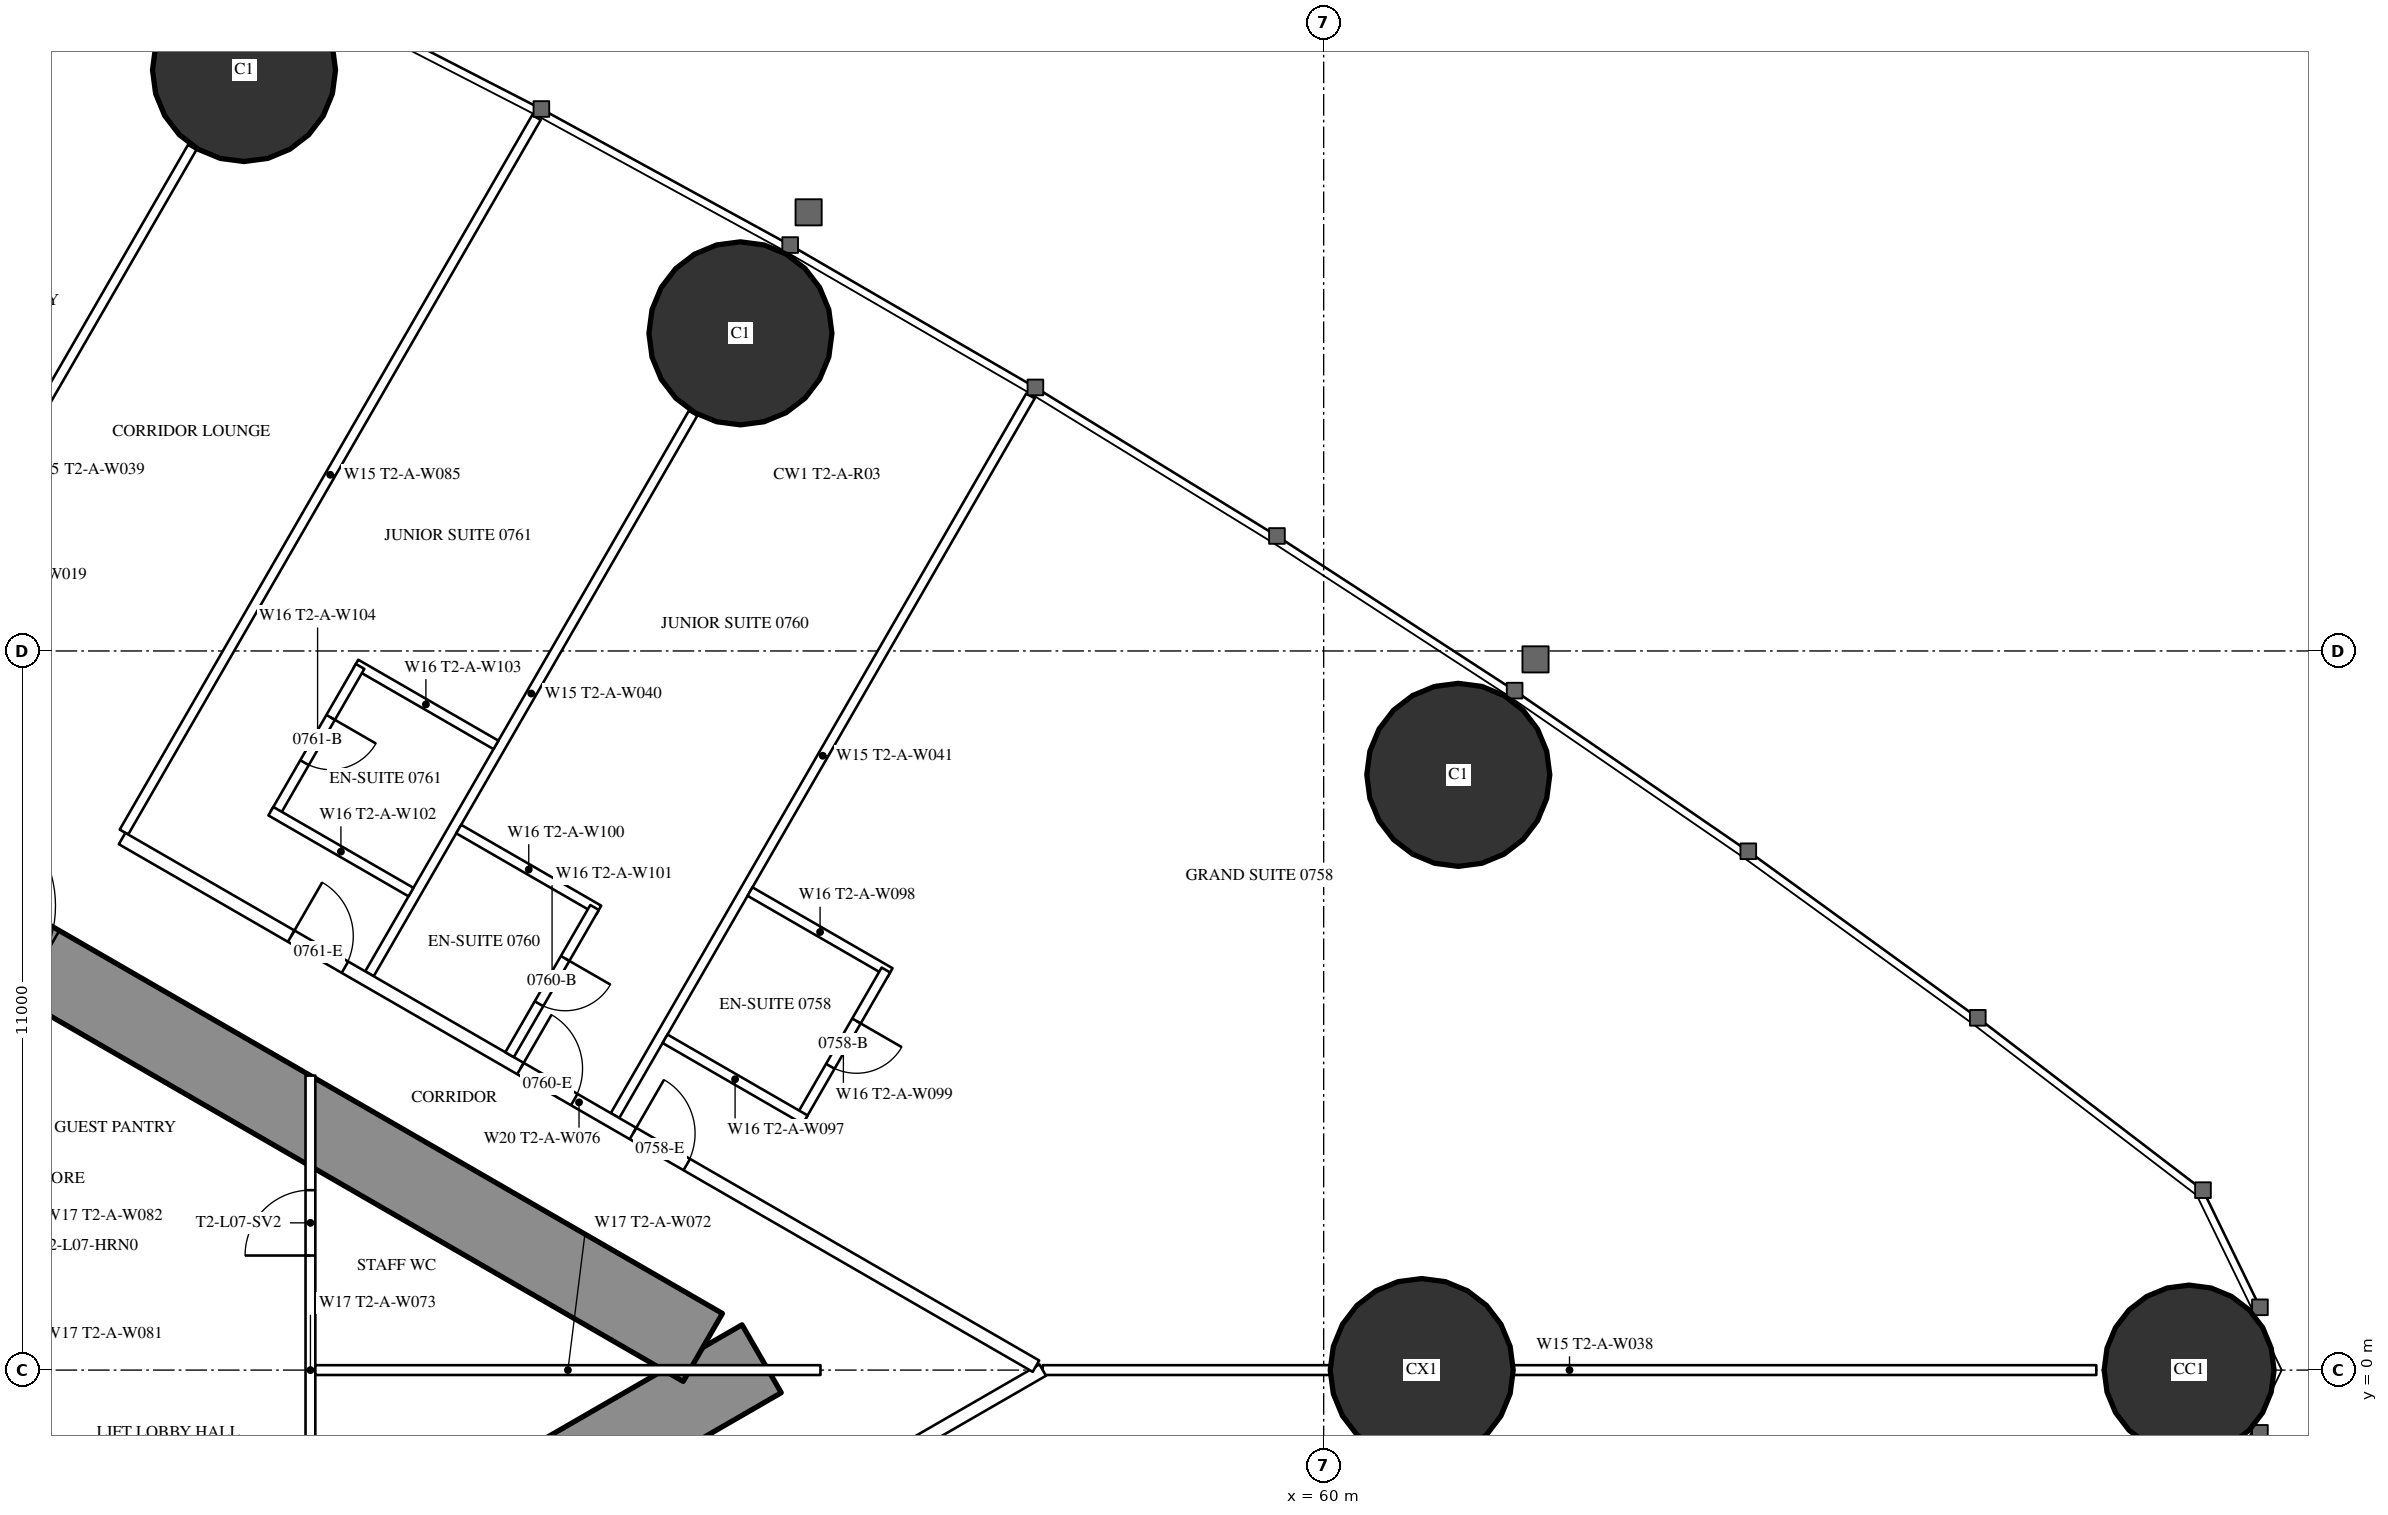
"""IFC4 building model, lengths in metres.
Left out: names, types, materials, properties, quantities, classifications, styles, units other than length and angle.
Written with IfcOpenShell. Run it as: python <this file> out.ifc"""

import sys

from ifc_helpers import new_model, si_unit, direction, frame, frame_2d, origin, origin_2d, place, context, subcontext, project, spatial, rectangle, hollow_circle, extrude, element, fill, save


model = new_model("IFC4")
c1 = context("Model", 3, precision=1e-05, world=origin(), true_north=direction((0.0, 1.0)))
c2 = subcontext(c1, "Body", "Model", "MODEL_VIEW")
j1 = project(units=[si_unit("LENGTHUNIT", "METRE"), si_unit("PLANEANGLEUNIT", "RADIAN")], contexts=[c1])
p1 = place(None, origin())
s1 = spatial("IfcSite", under=j1, at=p1, CompositionType="ELEMENT")
p2 = place(p1, origin())
s2 = spatial("IfcBuilding", under=s1, at=p2, CompositionType="ELEMENT")
p3 = place(p2, frame((0.0, 0.0, 32.0)))
s3 = spatial("IfcBuildingStorey", under=s2, at=p3, CompositionType="ELEMENT", Elevation=32.0)
p4 = place(p3, frame((73.239, 0.0, 0.0), z_axis=(0.0, 0.0, 1.0), x_axis=(1.0, 0.0, 0.0)))
e1 = element("IfcColumn", 1, at=p4, inside=s3, PredefinedType="COLUMN", context=c2, shape_type="SweptSolid", body=[
    extrude(hollow_circle(Radius=1.3, WallThickness=0.1, at=origin_2d()), origin(), (0.0, 0.0, 1.0), 3.5),
])
for number, where, z_axis, x_axis in (
    (2, (62.059, 9.105, 0.0), (0.0, 0.0, 1.0), (1.0, 0.0, 0.0)),
    (3, (51.078, 15.858, 0.0), (0.0, 0.0, 1.0), (1.0, 0.0, 0.0)),
    (4, (43.484, 19.886, 0.0), (0.0, 0.0, 1.0), (1.0, 0.0, 0.0)),
):
    element("IfcColumn", number, at=place(p3, frame(where, z_axis=z_axis, x_axis=x_axis)), inside=s3, PredefinedType="COLUMN", context=c2, shape_type="SweptSolid", body=[
        extrude(hollow_circle(Radius=1.4, WallThickness=0.12, at=origin_2d()), origin(), (0.0, 0.0, 1.0), 3.5),
    ])
p5 = place(p3, frame((61.5, 0.0, 0.0), z_axis=(0.0, 0.0, 1.0), x_axis=(1.0, 0.0, 0.0)))
e5 = element("IfcColumn", 5, at=p5, inside=s3, PredefinedType="COLUMN", context=c2, shape_type="SweptSolid", body=[
    extrude(hollow_circle(Radius=1.4, WallThickness=0.1, at=origin_2d()), origin(), (0.0, 0.0, 1.0), 3.5),
])
p6 = place(p3, frame((27.2, -13.8, 0.0), z_axis=(0.0, 0.0, 1.0), x_axis=(0.866027159892, 0.499996958321, 0.0)))
e6 = element("IfcWall", 6, at=p6, inside=s3, PredefinedType="SHEAR", context=c2, shape_type="SweptSolid", body=[
    extrude(rectangle(XDim=27.947, YDim=1.2, at=frame_2d((13.973, 0.0))), origin(), (0.0, 0.0, 1.0), 3.5),
])
p7 = place(p6, frame((4.6, 0.0, 0.0)))
e7 = element("IfcOpeningElement", 7, at=p7, cuts=e6, PredefinedType="OPENING", context=c2, shape_type="SweptSolid", body=[
    extrude(rectangle(XDim=1.0, YDim=2.2, at=frame_2d((0.5, 1.1))), frame((0.0, 0.61, 0.0), z_axis=(0.0, -1.0, 0.0), x_axis=(1.0, 0.0, 0.0)), (0.0, 0.0, 1.0), 1.22),
])
p8 = place(p6, frame((13.395, 0.0, 0.0)))
e8 = element("IfcOpeningElement", 8, at=p8, cuts=e6, PredefinedType="OPENING", context=c2, shape_type="SweptSolid", body=[
    extrude(rectangle(XDim=1.8, YDim=2.2, at=frame_2d((0.9, 1.1))), frame((0.0, 0.61, 0.0), z_axis=(0.0, -1.0, 0.0), x_axis=(1.0, 0.0, 0.0)), (0.0, 0.0, 1.0), 1.22),
])
p9 = place(p3, frame((27.2, 13.8, 0.0), z_axis=(0.0, 0.0, 1.0), x_axis=(0.866024515034, -0.500001539357, 0.0)))
e9 = element("IfcWall", 9, at=p9, inside=s3, PredefinedType="SHEAR", context=c2, shape_type="SweptSolid", body=[
    extrude(rectangle(XDim=26.907, YDim=1.2, at=frame_2d((13.454, 0.0))), origin(), (0.0, 0.0, 1.0), 3.5),
])
p10 = place(p9, frame((4.6, 0.0, 0.0)))
e10 = element("IfcOpeningElement", 10, at=p10, cuts=e9, PredefinedType="OPENING", context=c2, shape_type="SweptSolid", body=[
    extrude(rectangle(XDim=1.0, YDim=2.2, at=frame_2d((0.5, 1.1))), frame((0.0, 0.61, 0.0), z_axis=(0.0, -1.0, 0.0), x_axis=(1.0, 0.0, 0.0)), (0.0, 0.0, 1.0), 1.22),
])
p11 = place(p9, frame((13.395, 0.0, 0.0)))
e11 = element("IfcOpeningElement", 11, at=p11, cuts=e9, PredefinedType="OPENING", context=c2, shape_type="SweptSolid", body=[
    extrude(rectangle(XDim=1.8, YDim=2.2, at=frame_2d((0.9, 1.1))), frame((0.0, 0.61, 0.0), z_axis=(0.0, -1.0, 0.0), x_axis=(1.0, 0.0, 0.0)), (0.0, 0.0, 1.0), 1.22),
])
p12 = place(p3, frame((37.895, 10.396, 0.0), z_axis=(0.0, 0.0, 1.0), x_axis=(0.499995616528, 0.866027934568, 0.0)))
e12 = element("IfcWall", 12, at=p12, inside=s3, PredefinedType="PARTITIONING", context=c2, shape_type="SweptSolid", body=[
    extrude(rectangle(XDim=9.593, YDim=0.15, at=frame_2d((4.797, 0.0))), origin(), (0.0, 0.0, 1.0), 2.25),
])
p13 = place(p3, frame((41.647, 8.23, 0.0), z_axis=(0.0, 0.0, 1.0), x_axis=(0.49998590462, 0.866033541603, 0.0)))
e13 = element("IfcWall", 13, at=p13, inside=s3, PredefinedType="PARTITIONING", context=c2, shape_type="SweptSolid", body=[
    extrude(rectangle(XDim=12.621, YDim=0.15, at=frame_2d((6.311, 0.0))), origin(), (0.0, 0.0, 1.0), 3.25),
])
p14 = place(p3, frame((45.403, 6.062, 0.0), z_axis=(0.0, 0.0, 1.0), x_axis=(0.500013434677, 0.866017647131, 0.0)))
e14 = element("IfcWall", 14, at=p14, inside=s3, PredefinedType="PARTITIONING", context=c2, shape_type="SweptSolid", body=[
    extrude(rectangle(XDim=9.902, YDim=0.15, at=frame_2d((4.951, 0.0))), origin(), (0.0, 0.0, 1.0), 2.25),
])
p15 = place(p3, frame((49.159, 3.893, 0.0), z_axis=(0.0, 0.0, 1.0), x_axis=(0.499995664361, 0.866027906952, 0.0)))
e15 = element("IfcWall", 15, at=p15, inside=s3, PredefinedType="PARTITIONING", context=c2, shape_type="SweptSolid", body=[
    extrude(rectangle(XDim=12.711, YDim=0.15, at=frame_2d((6.356, 0.0))), origin(), (0.0, 0.0, 1.0), 3.25),
])
p16 = place(p3, frame((55.702, 0.0, 0.0), z_axis=(0.0, 0.0, 1.0), x_axis=(1.0, 0.0, 0.0)))
e16 = element("IfcWall", 16, at=p16, inside=s3, PredefinedType="PARTITIONING", context=c2, shape_type="SweptSolid", body=[
    extrude(rectangle(XDim=16.117, YDim=0.15, at=frame_2d((8.059, 0.0))), origin(), (0.0, 0.0, 1.0), 2.25),
])
p17 = place(p3, frame((37.96, -10.243, 0.0), z_axis=(0.0, 0.0, 1.0), x_axis=(0.866026429433, 0.499998223521, 0.0)))
e17 = element("IfcWall", 17, at=p17, inside=s3, PredefinedType="PARTITIONING", context=c2, shape_type="SweptSolid", body=[
    extrude(rectangle(XDim=20.487, YDim=0.2, at=frame_2d((10.243, 0.0))), origin(), (0.0, 0.0, 1.0), 3.25),
])
p18 = place(p17, frame((4.575, 0.0, 0.0)))
e18 = element("IfcOpeningElement", 18, at=p18, cuts=e17, PredefinedType="OPENING", context=c2, shape_type="SweptSolid", body=[
    extrude(rectangle(XDim=0.95, YDim=2.2, at=frame_2d((0.475, 1.1))), frame((0.0, 0.11, 0.0), z_axis=(0.0, -1.0, 0.0), x_axis=(1.0, 0.0, 0.0)), (0.0, 0.0, 1.0), 0.22),
])
p19 = place(p17, frame((9.199, 0.0, 0.0)))
e19 = element("IfcOpeningElement", 19, at=p19, cuts=e17, PredefinedType="OPENING", context=c2, shape_type="SweptSolid", body=[
    extrude(rectangle(XDim=0.95, YDim=2.2, at=frame_2d((0.475, 1.1))), frame((0.0, 0.11, 0.0), z_axis=(0.0, -1.0, 0.0), x_axis=(1.0, 0.0, 0.0)), (0.0, 0.0, 1.0), 0.22),
])
p20 = place(p17, frame((15.599, 0.0, 0.0)))
e20 = element("IfcOpeningElement", 20, at=p20, cuts=e17, PredefinedType="OPENING", context=c2, shape_type="SweptSolid", body=[
    extrude(rectangle(XDim=0.95, YDim=2.2, at=frame_2d((0.475, 1.1))), frame((0.0, 0.11, 0.0), z_axis=(0.0, -1.0, 0.0), x_axis=(1.0, 0.0, 0.0)), (0.0, 0.0, 1.0), 0.22),
])
p21 = place(p17, frame((2.875, 0.0, 0.0)))
e21 = element("IfcOpeningElement", 21, at=p21, cuts=e17, PredefinedType="OPENING", context=c2, shape_type="SweptSolid", body=[
    extrude(rectangle(XDim=0.95, YDim=2.2, at=frame_2d((0.475, 1.1))), frame((0.0, 0.11, 0.0), z_axis=(0.0, -1.0, 0.0), x_axis=(1.0, 0.0, 0.0)), (0.0, 0.0, 1.0), 0.22),
])
p22 = place(p3, frame((41.619, 8.131, 0.0), z_axis=(0.0, 0.0, 1.0), x_axis=(0.86603245327, -0.499987789734, 0.0)))
e22 = element("IfcWall", 22, at=p22, inside=s3, PredefinedType="PARTITIONING", context=c2, shape_type="SweptSolid", body=[
    extrude(rectangle(XDim=16.142, YDim=0.2, at=frame_2d((8.071, 0.0))), origin(), (0.0, 0.0, 1.0), 3.25),
])
p23 = place(p22, frame((9.024, 0.0, 0.0)))
e23 = element("IfcOpeningElement", 23, at=p23, cuts=e22, PredefinedType="OPENING", context=c2, shape_type="SweptSolid", body=[
    extrude(rectangle(XDim=0.95, YDim=2.2, at=frame_2d((0.475, 1.1))), frame((0.0, 0.11, 0.0), z_axis=(0.0, -1.0, 0.0), x_axis=(1.0, 0.0, 0.0)), (0.0, 0.0, 1.0), 0.22),
])
p24 = place(p22, frame((7.037, 0.0, 0.0)))
e24 = element("IfcOpeningElement", 24, at=p24, cuts=e22, PredefinedType="OPENING", context=c2, shape_type="SweptSolid", body=[
    extrude(rectangle(XDim=0.95, YDim=2.2, at=frame_2d((0.475, 1.1))), frame((0.0, 0.11, 0.0), z_axis=(0.0, -1.0, 0.0), x_axis=(1.0, 0.0, 0.0)), (0.0, 0.0, 1.0), 0.22),
])
p25 = place(p22, frame((2.987, 0.0, 0.0)))
e25 = element("IfcOpeningElement", 25, at=p25, cuts=e22, PredefinedType="OPENING", context=c2, shape_type="SweptSolid", body=[
    extrude(rectangle(XDim=0.95, YDim=2.2, at=frame_2d((0.475, 1.1))), frame((0.0, 0.11, 0.0), z_axis=(0.0, -1.0, 0.0), x_axis=(1.0, 0.0, 0.0)), (0.0, 0.0, 1.0), 0.22),
])
p26 = place(p3, frame((51.224, 7.32, 0.0), z_axis=(0.0, 0.0, 1.0), x_axis=(0.866031185235, -0.4999899861, 0.0)))
e26 = element("IfcWall", 26, at=p26, inside=s3, PredefinedType="PARTITIONING", context=c2, shape_type="SweptSolid", body=[
    extrude(rectangle(XDim=2.475, YDim=0.15, at=frame_2d((1.238, 0.0))), origin(), (0.0, 0.0, 1.0), 3.25),
])
p27 = place(p3, frame((52.003, 3.868, 0.0), z_axis=(0.0, 0.0, 1.0), x_axis=(0.500047596559, 0.865997922154, 0.0)))
e27 = element("IfcWall", 27, at=p27, inside=s3, PredefinedType="PARTITIONING", context=c2, shape_type="SweptSolid", body=[
    extrude(rectangle(XDim=2.6, YDim=0.15, at=frame_2d((1.3, 0.0))), origin(), (0.0, 0.0, 1.0), 3.25),
])
p28 = place(p27, frame((0.9, 0.0, 0.0)))
e28 = element("IfcOpeningElement", 28, at=p28, cuts=e27, PredefinedType="OPENING", context=c2, shape_type="SweptSolid", body=[
    extrude(rectangle(XDim=0.8, YDim=2.2, at=frame_2d((0.4, 1.1))), frame((0.0, 0.085, 0.0), z_axis=(0.0, -1.0, 0.0), x_axis=(1.0, 0.0, 0.0)), (0.0, 0.0, 1.0), 0.17),
])
p29 = place(p3, frame((49.925, 5.068, 0.0), z_axis=(0.0, 0.0, 1.0), x_axis=(0.866006523861, -0.500032699561, 0.0)))
e29 = element("IfcWall", 29, at=p29, inside=s3, PredefinedType="PARTITIONING", context=c2, shape_type="SweptSolid", body=[
    extrude(rectangle(XDim=2.475, YDim=0.15, at=frame_2d((1.237, 0.0))), origin(), (0.0, 0.0, 1.0), 3.25),
])
p30 = place(p3, frame((46.768, 8.276, 0.0), z_axis=(0.0, 0.0, 1.0), x_axis=(0.866031185235, -0.4999899861, 0.0)))
e30 = element("IfcWall", 30, at=p30, inside=s3, PredefinedType="PARTITIONING", context=c2, shape_type="SweptSolid", body=[
    extrude(rectangle(XDim=2.475, YDim=0.15, at=frame_2d((1.238, 0.0))), origin(), (0.0, 0.0, 1.0), 3.25),
])
p31 = place(p3, frame((47.546, 4.824, 0.0), z_axis=(0.0, 0.0, 1.0), x_axis=(0.500006934395, 0.866021400173, 0.0)))
e31 = element("IfcWall", 31, at=p31, inside=s3, PredefinedType="PARTITIONING", context=c2, shape_type="SweptSolid", body=[
    extrude(rectangle(XDim=2.6, YDim=0.15, at=frame_2d((1.3, 0.0))), origin(), (0.0, 0.0, 1.0), 3.25),
])
p32 = place(p31, frame((0.9, 0.0, 0.0)))
e32 = element("IfcOpeningElement", 32, at=p32, cuts=e31, PredefinedType="OPENING", context=c2, shape_type="SweptSolid", body=[
    extrude(rectangle(XDim=0.8, YDim=2.2, at=frame_2d((0.4, 1.1))), frame((0.0, 0.085, 0.0), z_axis=(0.0, -1.0, 0.0), x_axis=(1.0, 0.0, 0.0)), (0.0, 0.0, 1.0), 0.17),
])
p33 = place(p3, frame((45.195, 10.801, 0.0), z_axis=(0.0, 0.0, 1.0), x_axis=(0.86604923931, -0.499958713387, 0.0)))
e33 = element("IfcWall", 33, at=p33, inside=s3, PredefinedType="PARTITIONING", context=c2, shape_type="SweptSolid", body=[
    extrude(rectangle(XDim=2.475, YDim=0.15, at=frame_2d((1.237, 0.0))), origin(), (0.0, 0.0, 1.0), 3.25),
])
p34 = place(p3, frame((43.959, 8.512, 0.0), z_axis=(0.0, 0.0, 1.0), x_axis=(0.500006934395, 0.866021400173, 0.0)))
e34 = element("IfcWall", 34, at=p34, inside=s3, PredefinedType="PARTITIONING", context=c2, shape_type="SweptSolid", body=[
    extrude(rectangle(XDim=2.6, YDim=0.15, at=frame_2d((1.3, 0.0))), origin(), (0.0, 0.0, 1.0), 3.25),
])
p35 = place(p34, frame((0.9, 0.0, 0.0)))
e35 = element("IfcOpeningElement", 35, at=p35, cuts=e34, PredefinedType="OPENING", context=c2, shape_type="SweptSolid", body=[
    extrude(rectangle(XDim=0.8, YDim=2.2, at=frame_2d((0.4, 1.1))), frame((0.0, 0.085, 0.0), z_axis=(0.0, -1.0, 0.0), x_axis=(1.0, 0.0, 0.0)), (0.0, 0.0, 1.0), 0.17),
])
p36 = place(p3, frame((43.895, 8.549, 0.0), z_axis=(0.0, 0.0, 1.0), x_axis=(0.866031185235, -0.4999899861, 0.0)))
e36 = element("IfcWall", 36, at=p36, inside=s3, PredefinedType="PARTITIONING", context=c2, shape_type="SweptSolid", body=[
    extrude(rectangle(XDim=2.475, YDim=0.15, at=frame_2d((1.238, 0.0))), origin(), (0.0, 0.0, 1.0), 3.25),
])
p37 = place(p3, frame((44.5, -4.505, 0.0), z_axis=(0.0, 0.0, 1.0), x_axis=(0.0, 1.0, 0.0)))
e37 = element("IfcWall", 37, at=p37, inside=s3, PredefinedType="PARTITIONING", context=c2, shape_type="SweptSolid", body=[
    extrude(rectangle(XDim=9.009, YDim=0.15, at=frame_2d((4.505, 0.0))), origin(), (0.0, 0.0, 1.0), 2.45),
])
p38 = place(p37, frame((1.752, 0.0, 0.0)))
e38 = element("IfcOpeningElement", 38, at=p38, cuts=e37, PredefinedType="OPENING", context=c2, shape_type="SweptSolid", body=[
    extrude(rectangle(XDim=1.0, YDim=2.2, at=frame_2d((0.5, 1.1))), frame((0.0, 0.085, 0.0), z_axis=(0.0, -1.0, 0.0), x_axis=(1.0, 0.0, 0.0)), (0.0, 0.0, 1.0), 0.17),
])
p39 = place(p37, frame((6.257, 0.0, 0.0)))
e39 = element("IfcOpeningElement", 39, at=p39, cuts=e37, PredefinedType="OPENING", context=c2, shape_type="SweptSolid", body=[
    extrude(rectangle(XDim=1.0, YDim=2.2, at=frame_2d((0.5, 1.1))), frame((0.0, 0.085, 0.0), z_axis=(0.0, -1.0, 0.0), x_axis=(1.0, 0.0, 0.0)), (0.0, 0.0, 1.0), 0.17),
])
p40 = place(p3, frame((44.575, 0.0, 0.0), z_axis=(0.0, 0.0, 1.0), x_axis=(1.0, 0.0, 0.0)))
e40 = element("IfcWall", 40, at=p40, inside=s3, PredefinedType="PARTITIONING", context=c2, shape_type="SweptSolid", body=[
    extrude(rectangle(XDim=7.727, YDim=0.15, at=frame_2d((3.864, 0.0))), origin(), (0.0, 0.0, 1.0), 2.25),
])
p41 = place(p28, origin())
e41 = element("IfcDoor", 41, at=p41, inside=s3, OperationType="SINGLE_SWING_RIGHT", PredefinedType="DOOR", context=c2, shape_type="SweptSolid", body=[
    extrude(rectangle(XDim=0.8, YDim=2.2, at=frame_2d((0.4, 1.1))), frame((0.0, 0.025, 0.0), z_axis=(0.0, -1.0, 0.0), x_axis=(1.0, 0.0, 0.0)), (0.0, 0.0, 1.0), 0.05),
])
fill(e28, e41)
p42 = place(p23, origin())
e42 = element("IfcDoor", 42, at=p42, inside=s3, OperationType="SINGLE_SWING_LEFT", PredefinedType="DOOR", context=c2, shape_type="SweptSolid", body=[
    extrude(rectangle(XDim=0.95, YDim=2.2, at=frame_2d((0.475, 1.1))), frame((0.0, 0.025, 0.0), z_axis=(0.0, -1.0, 0.0), x_axis=(1.0, 0.0, 0.0)), (0.0, 0.0, 1.0), 0.05),
])
fill(e23, e42)
p43 = place(p32, origin())
e43 = element("IfcDoor", 43, at=p43, inside=s3, OperationType="SINGLE_SWING_RIGHT", PredefinedType="DOOR", context=c2, shape_type="SweptSolid", body=[
    extrude(rectangle(XDim=0.8, YDim=2.2, at=frame_2d((0.4, 1.1))), frame((0.0, 0.025, 0.0), z_axis=(0.0, -1.0, 0.0), x_axis=(1.0, 0.0, 0.0)), (0.0, 0.0, 1.0), 0.05),
])
fill(e32, e43)
p44 = place(p24, origin())
e44 = element("IfcDoor", 44, at=p44, inside=s3, OperationType="SINGLE_SWING_LEFT", PredefinedType="DOOR", context=c2, shape_type="SweptSolid", body=[
    extrude(rectangle(XDim=0.95, YDim=2.2, at=frame_2d((0.475, 1.1))), frame((0.0, 0.025, 0.0), z_axis=(0.0, -1.0, 0.0), x_axis=(1.0, 0.0, 0.0)), (0.0, 0.0, 1.0), 0.05),
])
fill(e24, e44)
p45 = place(p35, origin())
e45 = element("IfcDoor", 45, at=p45, inside=s3, OperationType="SINGLE_SWING_RIGHT", PredefinedType="DOOR", context=c2, shape_type="SweptSolid", body=[
    extrude(rectangle(XDim=0.8, YDim=2.2, at=frame_2d((0.4, 1.1))), frame((0.0, 0.025, 0.0), z_axis=(0.0, -1.0, 0.0), x_axis=(1.0, 0.0, 0.0)), (0.0, 0.0, 1.0), 0.05),
])
fill(e35, e45)
p46 = place(p25, origin())
e46 = element("IfcDoor", 46, at=p46, inside=s3, OperationType="SINGLE_SWING_LEFT", PredefinedType="DOOR", context=c2, shape_type="SweptSolid", body=[
    extrude(rectangle(XDim=0.95, YDim=2.2, at=frame_2d((0.475, 1.1))), frame((0.0, 0.025, 0.0), z_axis=(0.0, -1.0, 0.0), x_axis=(1.0, 0.0, 0.0)), (0.0, 0.0, 1.0), 0.05),
])
fill(e25, e46)
p47 = place(p39, origin())
e47 = element("IfcDoor", 47, at=p47, inside=s3, OperationType="SINGLE_SWING_LEFT", PredefinedType="DOOR", context=c2, shape_type="SweptSolid", body=[
    extrude(rectangle(XDim=1.0, YDim=2.2, at=frame_2d((0.5, 1.1))), frame((0.0, 0.025, 0.0), z_axis=(0.0, -1.0, 0.0), x_axis=(1.0, 0.0, 0.0)), (0.0, 0.0, 1.0), 0.05),
])
fill(e39, e47)
save(model, sys.argv[1])
